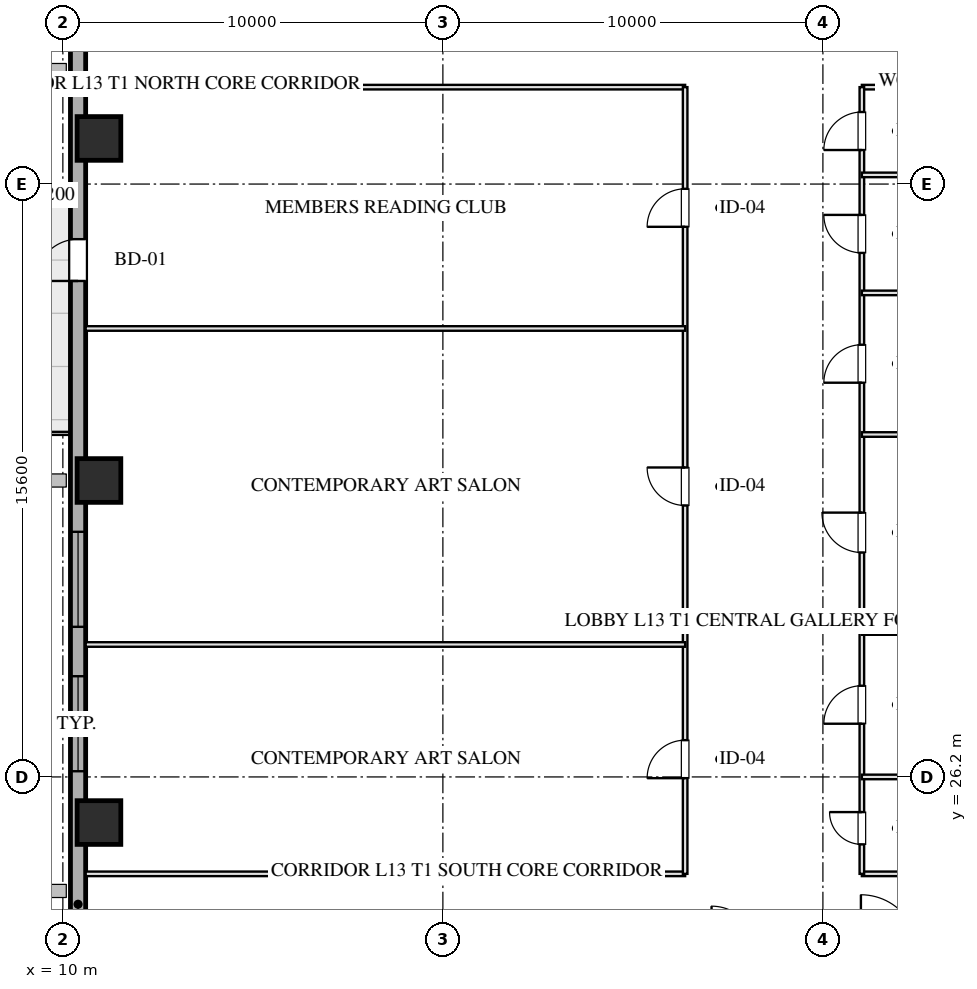
"""IFC4 building model, lengths in metres.
Left out: names, types, materials, properties, quantities, classifications, styles, units other than length and angle.
Written with IfcOpenShell. Run it as: python <this file> out.ifc"""

import sys

from ifc_helpers import new_model, si_unit, direction, frame, frame_2d, origin, origin_2d, place, context, subcontext, project, spatial, rectangle, hollow_rectangle, extrude, element, fill, save


model = new_model("IFC4")
c1 = context("Model", 3, precision=1e-05, world=origin(), true_north=direction((0.0, 1.0)))
c2 = subcontext(c1, "Body", "Model", "MODEL_VIEW")
j1 = project(units=[si_unit("LENGTHUNIT", "METRE"), si_unit("PLANEANGLEUNIT", "RADIAN")], contexts=[c1])
p1 = place(None, origin())
s1 = spatial("IfcSite", under=j1, at=p1, CompositionType="ELEMENT")
p2 = place(p1, origin())
s2 = spatial("IfcBuilding", under=s1, at=p2, CompositionType="ELEMENT")
p3 = place(p2, frame((0.0, 0.0, 57.5)))
s3 = spatial("IfcBuildingStorey", under=s2, at=p3, CompositionType="ELEMENT", Elevation=57.5)
for number, where, z_axis, x_axis in (
    (1, (10.95, 25.0, 0.0), (0.0, 0.0, 1.0), (1.0, 0.0, 0.0)),
    (2, (10.95, 34.0, 0.0), (0.0, 0.0, 1.0), (1.0, 0.0, 0.0)),
    (3, (10.95, 43.0, 0.0), (0.0, 0.0, 1.0), (1.0, 0.0, 0.0)),
):
    element("IfcColumn", number, at=place(p3, frame(where, z_axis=z_axis, x_axis=x_axis)), inside=s3, PredefinedType="COLUMN", context=c2, shape_type="SweptSolid", body=[
        extrude(hollow_rectangle(XDim=1.15, YDim=1.15, WallThickness=0.04, at=origin_2d()), origin(), (0.0, 0.0, 1.0), 3.451),
    ])
p4 = place(p3, frame((10.4, 7.2, 0.0), z_axis=(0.0, 0.0, 1.0), x_axis=(0.0, 1.0, 0.0)))
e4 = element("IfcWall", 4, at=p4, inside=s3, PredefinedType="SOLIDWALL", context=c2, shape_type="SweptSolid", body=[
    extrude(rectangle(XDim=53.6, YDim=0.4, at=frame_2d((26.8, 0.0))), origin(), (0.0, 0.0, 1.0), 2.61),
])
p5 = place(p4, frame((19.15, 0.0, 0.75)))
e5 = element("IfcOpeningElement", 5, at=p5, cuts=e4, PredefinedType="OPENING", context=c2, shape_type="SweptSolid", body=[
    extrude(rectangle(XDim=2.5, YDim=1.46, at=frame_2d((1.25, 0.73))), frame((0.0, 0.21, 0.0), z_axis=(0.0, -1.0, 0.0), x_axis=(1.0, 0.0, 0.0)), (0.0, 0.0, 1.0), 0.42),
])
p6 = place(p4, frame((22.95, 0.0, 0.75)))
e6 = element("IfcOpeningElement", 6, at=p6, cuts=e4, PredefinedType="OPENING", context=c2, shape_type="SweptSolid", body=[
    extrude(rectangle(XDim=2.5, YDim=1.46, at=frame_2d((1.25, 0.73))), frame((0.0, 0.21, 0.0), z_axis=(0.0, -1.0, 0.0), x_axis=(1.0, 0.0, 0.0)), (0.0, 0.0, 1.0), 0.42),
])
p7 = place(p4, frame((32.05, 0.0, 0.0)))
e7 = element("IfcOpeningElement", 7, at=p7, cuts=e4, PredefinedType="OPENING", context=c2, shape_type="SweptSolid", body=[
    extrude(rectangle(XDim=1.1, YDim=2.15, at=frame_2d((0.55, 1.075))), frame((0.0, 0.21, 0.0), z_axis=(0.0, -1.0, 0.0), x_axis=(1.0, 0.0, 0.0)), (0.0, 0.0, 1.0), 0.42),
])
p8 = place(p3, frame((10.6, 23.65, 0.0), z_axis=(0.0, 0.0, 1.0), x_axis=(1.0, 0.0, 0.0)))
e8 = element("IfcWall", 8, at=p8, inside=s3, PredefinedType="PARTITIONING", context=c2, shape_type="SweptSolid", body=[
    extrude(rectangle(XDim=15.775, YDim=0.12, at=frame_2d((7.887, 0.0))), origin(), (0.0, 0.0, 1.0), 3.175),
])
p9 = place(p3, frame((31.025, 23.65, 0.0), z_axis=(0.0, 0.0, 1.0), x_axis=(1.0, 0.0, 0.0)))
e9 = element("IfcWall", 9, at=p9, inside=s3, PredefinedType="PARTITIONING", context=c2, shape_type="SweptSolid", body=[
    extrude(rectangle(XDim=18.375, YDim=0.12, at=frame_2d((9.188, 0.0))), origin(), (0.0, 0.0, 1.0), 3.175),
])
p10 = place(p3, frame((10.6, 44.35, 0.0), z_axis=(0.0, 0.0, 1.0), x_axis=(1.0, 0.0, 0.0)))
e10 = element("IfcWall", 10, at=p10, inside=s3, PredefinedType="PARTITIONING", context=c2, shape_type="SweptSolid", body=[
    extrude(rectangle(XDim=15.775, YDim=0.12, at=frame_2d((7.887, 0.0))), origin(), (0.0, 0.0, 1.0), 3.175),
])
p11 = place(p3, frame((31.025, 44.35, 0.0), z_axis=(0.0, 0.0, 1.0), x_axis=(1.0, 0.0, 0.0)))
e11 = element("IfcWall", 11, at=p11, inside=s3, PredefinedType="PARTITIONING", context=c2, shape_type="SweptSolid", body=[
    extrude(rectangle(XDim=18.375, YDim=0.12, at=frame_2d((9.188, 0.0))), origin(), (0.0, 0.0, 1.0), 3.175),
])
p12 = place(p3, frame((26.375, 23.65, 0.0), z_axis=(0.0, 0.0, 1.0), x_axis=(0.0, 1.0, 0.0)))
e12 = element("IfcWall", 12, at=p12, inside=s3, PredefinedType="PARTITIONING", context=c2, shape_type="SweptSolid", body=[
    extrude(rectangle(XDim=20.7, YDim=0.12, at=frame_2d((10.35, 0.0))), origin(), (0.0, 0.0, 1.0), 3.175),
])
p13 = place(p12, frame((2.518, 0.0, 0.0)))
e13 = element("IfcOpeningElement", 13, at=p13, cuts=e12, PredefinedType="OPENING", context=c2, shape_type="SweptSolid", body=[
    extrude(rectangle(XDim=1.0, YDim=2.05, at=frame_2d((0.5, 1.025))), frame((0.0, 0.07, 0.0), z_axis=(0.0, -1.0, 0.0), x_axis=(1.0, 0.0, 0.0)), (0.0, 0.0, 1.0), 0.14),
])
p14 = place(p12, frame((9.692, 0.0, 0.0)))
e14 = element("IfcOpeningElement", 14, at=p14, cuts=e12, PredefinedType="OPENING", context=c2, shape_type="SweptSolid", body=[
    extrude(rectangle(XDim=1.0, YDim=2.05, at=frame_2d((0.5, 1.025))), frame((0.0, 0.07, 0.0), z_axis=(0.0, -1.0, 0.0), x_axis=(1.0, 0.0, 0.0)), (0.0, 0.0, 1.0), 0.14),
])
p15 = place(p12, frame((17.025, 0.0, 0.0)))
e15 = element("IfcOpeningElement", 15, at=p15, cuts=e12, PredefinedType="OPENING", context=c2, shape_type="SweptSolid", body=[
    extrude(rectangle(XDim=1.0, YDim=2.05, at=frame_2d((0.5, 1.025))), frame((0.0, 0.07, 0.0), z_axis=(0.0, -1.0, 0.0), x_axis=(1.0, 0.0, 0.0)), (0.0, 0.0, 1.0), 0.14),
])
p16 = place(p3, frame((31.025, 23.65, 0.0), z_axis=(0.0, 0.0, 1.0), x_axis=(0.0, 1.0, 0.0)))
e16 = element("IfcWall", 16, at=p16, inside=s3, PredefinedType="PARTITIONING", context=c2, shape_type="SweptSolid", body=[
    extrude(rectangle(XDim=20.7, YDim=0.12, at=frame_2d((10.35, 0.0))), origin(), (0.0, 0.0, 1.0), 3.175),
])
p17 = place(p16, frame((0.775, 0.0, 0.0)))
e17 = element("IfcOpeningElement", 17, at=p17, cuts=e16, PredefinedType="OPENING", context=c2, shape_type="SweptSolid", body=[
    extrude(rectangle(XDim=0.85, YDim=2.05, at=frame_2d((0.425, 1.025))), frame((0.0, 0.07, 0.0), z_axis=(0.0, -1.0, 0.0), x_axis=(1.0, 0.0, 0.0)), (0.0, 0.0, 1.0), 0.14),
])
p18 = place(p16, frame((3.95, 0.0, 0.0)))
e18 = element("IfcOpeningElement", 18, at=p18, cuts=e16, PredefinedType="OPENING", context=c2, shape_type="SweptSolid", body=[
    extrude(rectangle(XDim=1.0, YDim=2.05, at=frame_2d((0.5, 1.025))), frame((0.0, 0.07, 0.0), z_axis=(0.0, -1.0, 0.0), x_axis=(1.0, 0.0, 0.0)), (0.0, 0.0, 1.0), 0.14),
])
p19 = place(p16, frame((8.455, 0.0, 0.0)))
e19 = element("IfcOpeningElement", 19, at=p19, cuts=e16, PredefinedType="OPENING", context=c2, shape_type="SweptSolid", body=[
    extrude(rectangle(XDim=1.05, YDim=2.05, at=frame_2d((0.525, 1.025))), frame((0.0, 0.07, 0.0), z_axis=(0.0, -1.0, 0.0), x_axis=(1.0, 0.0, 0.0)), (0.0, 0.0, 1.0), 0.14),
])
p20 = place(p16, frame((12.923, 0.0, 0.0)))
e20 = element("IfcOpeningElement", 20, at=p20, cuts=e16, PredefinedType="OPENING", context=c2, shape_type="SweptSolid", body=[
    extrude(rectangle(XDim=1.0, YDim=2.05, at=frame_2d((0.5, 1.025))), frame((0.0, 0.07, 0.0), z_axis=(0.0, -1.0, 0.0), x_axis=(1.0, 0.0, 0.0)), (0.0, 0.0, 1.0), 0.14),
])
p21 = place(p16, frame((16.338, 0.0, 0.0)))
e21 = element("IfcOpeningElement", 21, at=p21, cuts=e16, PredefinedType="OPENING", context=c2, shape_type="SweptSolid", body=[
    extrude(rectangle(XDim=1.0, YDim=2.05, at=frame_2d((0.5, 1.025))), frame((0.0, 0.07, 0.0), z_axis=(0.0, -1.0, 0.0), x_axis=(1.0, 0.0, 0.0)), (0.0, 0.0, 1.0), 0.14),
])
p22 = place(p16, frame((19.045, 0.0, 0.0)))
e22 = element("IfcOpeningElement", 22, at=p22, cuts=e16, PredefinedType="OPENING", context=c2, shape_type="SweptSolid", body=[
    extrude(rectangle(XDim=1.0, YDim=2.05, at=frame_2d((0.5, 1.025))), frame((0.0, 0.07, 0.0), z_axis=(0.0, -1.0, 0.0), x_axis=(1.0, 0.0, 0.0)), (0.0, 0.0, 1.0), 0.14),
])
for number, where, z_axis, x_axis in (
    (23, (10.6, 29.685, 0.0), (0.0, 0.0, 1.0), (1.0, 0.0, 0.0)),
    (24, (10.6, 38.0, 0.0), (0.0, 0.0, 1.0), (1.0, 0.0, 0.0)),
):
    element("IfcWall", number, at=place(p3, frame(where, z_axis=z_axis, x_axis=x_axis)), inside=s3, PredefinedType="PARTITIONING", context=c2, shape_type="SweptSolid", body=[
        extrude(rectangle(XDim=15.775, YDim=0.12, at=frame_2d((7.887, 0.0))), origin(), (0.0, 0.0, 1.0), 3.175),
    ])
for number, where, z_axis, x_axis in (
    (25, (31.025, 26.2, 0.0), (0.0, 0.0, 1.0), (1.0, 0.0, 0.0)),
    (26, (31.025, 30.0, 0.0), (0.0, 0.0, 1.0), (1.0, 0.0, 0.0)),
    (27, (31.025, 35.21, 0.0), (0.0, 0.0, 1.0), (1.0, 0.0, 0.0)),
    (28, (31.025, 38.936, 0.0), (0.0, 0.0, 1.0), (1.0, 0.0, 0.0)),
    (29, (31.025, 42.041, 0.0), (0.0, 0.0, 1.0), (1.0, 0.0, 0.0)),
):
    element("IfcWall", number, at=place(p3, frame(where, z_axis=z_axis, x_axis=x_axis)), inside=s3, PredefinedType="PARTITIONING", context=c2, shape_type="SweptSolid", body=[
        extrude(rectangle(XDim=18.375, YDim=0.12, at=frame_2d((9.188, 0.0))), origin(), (0.0, 0.0, 1.0), 3.175),
    ])
p23 = place(p5, origin())
e30 = element("IfcWindow", 30, at=p23, inside=s3, PartitioningType="TRIPLE_PANEL_VERTICAL", PredefinedType="WINDOW", context=c2, shape_type="SweptSolid", body=[
    extrude(rectangle(XDim=2.5, YDim=1.46, at=frame_2d((1.25, 0.73))), frame((0.0, 0.03, 0.0), z_axis=(0.0, -1.0, 0.0), x_axis=(1.0, 0.0, 0.0)), (0.0, 0.0, 1.0), 0.06),
])
fill(e5, e30)
p24 = place(p6, origin())
e31 = element("IfcWindow", 31, at=p24, inside=s3, PartitioningType="TRIPLE_PANEL_VERTICAL", PredefinedType="WINDOW", context=c2, shape_type="SweptSolid", body=[
    extrude(rectangle(XDim=2.5, YDim=1.46, at=frame_2d((1.25, 0.73))), frame((0.0, 0.03, 0.0), z_axis=(0.0, -1.0, 0.0), x_axis=(1.0, 0.0, 0.0)), (0.0, 0.0, 1.0), 0.06),
])
fill(e6, e31)
p25 = place(p7, origin())
e32 = element("IfcDoor", 32, at=p25, inside=s3, OperationType="SINGLE_SWING_LEFT", PredefinedType="DOOR", context=c2, shape_type="SweptSolid", body=[
    extrude(rectangle(XDim=1.1, YDim=2.15, at=frame_2d((0.55, 1.075))), frame((0.0, 0.025, 0.0), z_axis=(0.0, -1.0, 0.0), x_axis=(1.0, 0.0, 0.0)), (0.0, 0.0, 1.0), 0.05),
])
fill(e7, e32)
p26 = place(p13, origin())
e33 = element("IfcDoor", 33, at=p26, inside=s3, OperationType="SINGLE_SWING_LEFT", PredefinedType="DOOR", context=c2, shape_type="SweptSolid", body=[
    extrude(rectangle(XDim=1.0, YDim=2.05, at=frame_2d((0.5, 1.025))), frame((0.0, 0.025, 0.0), z_axis=(0.0, -1.0, 0.0), x_axis=(1.0, 0.0, 0.0)), (0.0, 0.0, 1.0), 0.05),
])
fill(e13, e33)
p27 = place(p14, origin())
e34 = element("IfcDoor", 34, at=p27, inside=s3, OperationType="SINGLE_SWING_RIGHT", PredefinedType="DOOR", context=c2, shape_type="SweptSolid", body=[
    extrude(rectangle(XDim=1.0, YDim=2.05, at=frame_2d((0.5, 1.025))), frame((0.0, 0.025, 0.0), z_axis=(0.0, -1.0, 0.0), x_axis=(1.0, 0.0, 0.0)), (0.0, 0.0, 1.0), 0.05),
])
fill(e14, e34)
p28 = place(p15, origin())
e35 = element("IfcDoor", 35, at=p28, inside=s3, OperationType="SINGLE_SWING_LEFT", PredefinedType="DOOR", context=c2, shape_type="SweptSolid", body=[
    extrude(rectangle(XDim=1.0, YDim=2.05, at=frame_2d((0.5, 1.025))), frame((0.0, 0.025, 0.0), z_axis=(0.0, -1.0, 0.0), x_axis=(1.0, 0.0, 0.0)), (0.0, 0.0, 1.0), 0.05),
])
fill(e15, e35)
p29 = place(p17, origin())
e36 = element("IfcDoor", 36, at=p29, inside=s3, OperationType="SINGLE_SWING_RIGHT", PredefinedType="DOOR", context=c2, shape_type="SweptSolid", body=[
    extrude(rectangle(XDim=0.85, YDim=2.05, at=frame_2d((0.425, 1.025))), frame((0.0, 0.025, 0.0), z_axis=(0.0, -1.0, 0.0), x_axis=(1.0, 0.0, 0.0)), (0.0, 0.0, 1.0), 0.05),
])
fill(e17, e36)
p30 = place(p18, origin())
e37 = element("IfcDoor", 37, at=p30, inside=s3, OperationType="SINGLE_SWING_LEFT", PredefinedType="DOOR", context=c2, shape_type="SweptSolid", body=[
    extrude(rectangle(XDim=1.0, YDim=2.05, at=frame_2d((0.5, 1.025))), frame((0.0, 0.025, 0.0), z_axis=(0.0, -1.0, 0.0), x_axis=(1.0, 0.0, 0.0)), (0.0, 0.0, 1.0), 0.05),
])
fill(e18, e37)
p31 = place(p19, origin())
e38 = element("IfcDoor", 38, at=p31, inside=s3, OperationType="SINGLE_SWING_RIGHT", PredefinedType="DOOR", context=c2, shape_type="SweptSolid", body=[
    extrude(rectangle(XDim=1.05, YDim=2.05, at=frame_2d((0.525, 1.025))), frame((0.0, 0.025, 0.0), z_axis=(0.0, -1.0, 0.0), x_axis=(1.0, 0.0, 0.0)), (0.0, 0.0, 1.0), 0.05),
])
fill(e19, e38)
p32 = place(p20, origin())
e39 = element("IfcDoor", 39, at=p32, inside=s3, OperationType="SINGLE_SWING_LEFT", PredefinedType="DOOR", context=c2, shape_type="SweptSolid", body=[
    extrude(rectangle(XDim=1.0, YDim=2.05, at=frame_2d((0.5, 1.025))), frame((0.0, 0.025, 0.0), z_axis=(0.0, -1.0, 0.0), x_axis=(1.0, 0.0, 0.0)), (0.0, 0.0, 1.0), 0.05),
])
fill(e20, e39)
p33 = place(p21, origin())
e40 = element("IfcDoor", 40, at=p33, inside=s3, OperationType="SINGLE_SWING_RIGHT", PredefinedType="DOOR", context=c2, shape_type="SweptSolid", body=[
    extrude(rectangle(XDim=1.0, YDim=2.05, at=frame_2d((0.5, 1.025))), frame((0.0, 0.025, 0.0), z_axis=(0.0, -1.0, 0.0), x_axis=(1.0, 0.0, 0.0)), (0.0, 0.0, 1.0), 0.05),
])
fill(e21, e40)
p34 = place(p22, origin())
e41 = element("IfcDoor", 41, at=p34, inside=s3, OperationType="SINGLE_SWING_LEFT", PredefinedType="DOOR", context=c2, shape_type="SweptSolid", body=[
    extrude(rectangle(XDim=1.0, YDim=2.05, at=frame_2d((0.5, 1.025))), frame((0.0, 0.025, 0.0), z_axis=(0.0, -1.0, 0.0), x_axis=(1.0, 0.0, 0.0)), (0.0, 0.0, 1.0), 0.05),
])
fill(e22, e41)
save(model, sys.argv[1])
